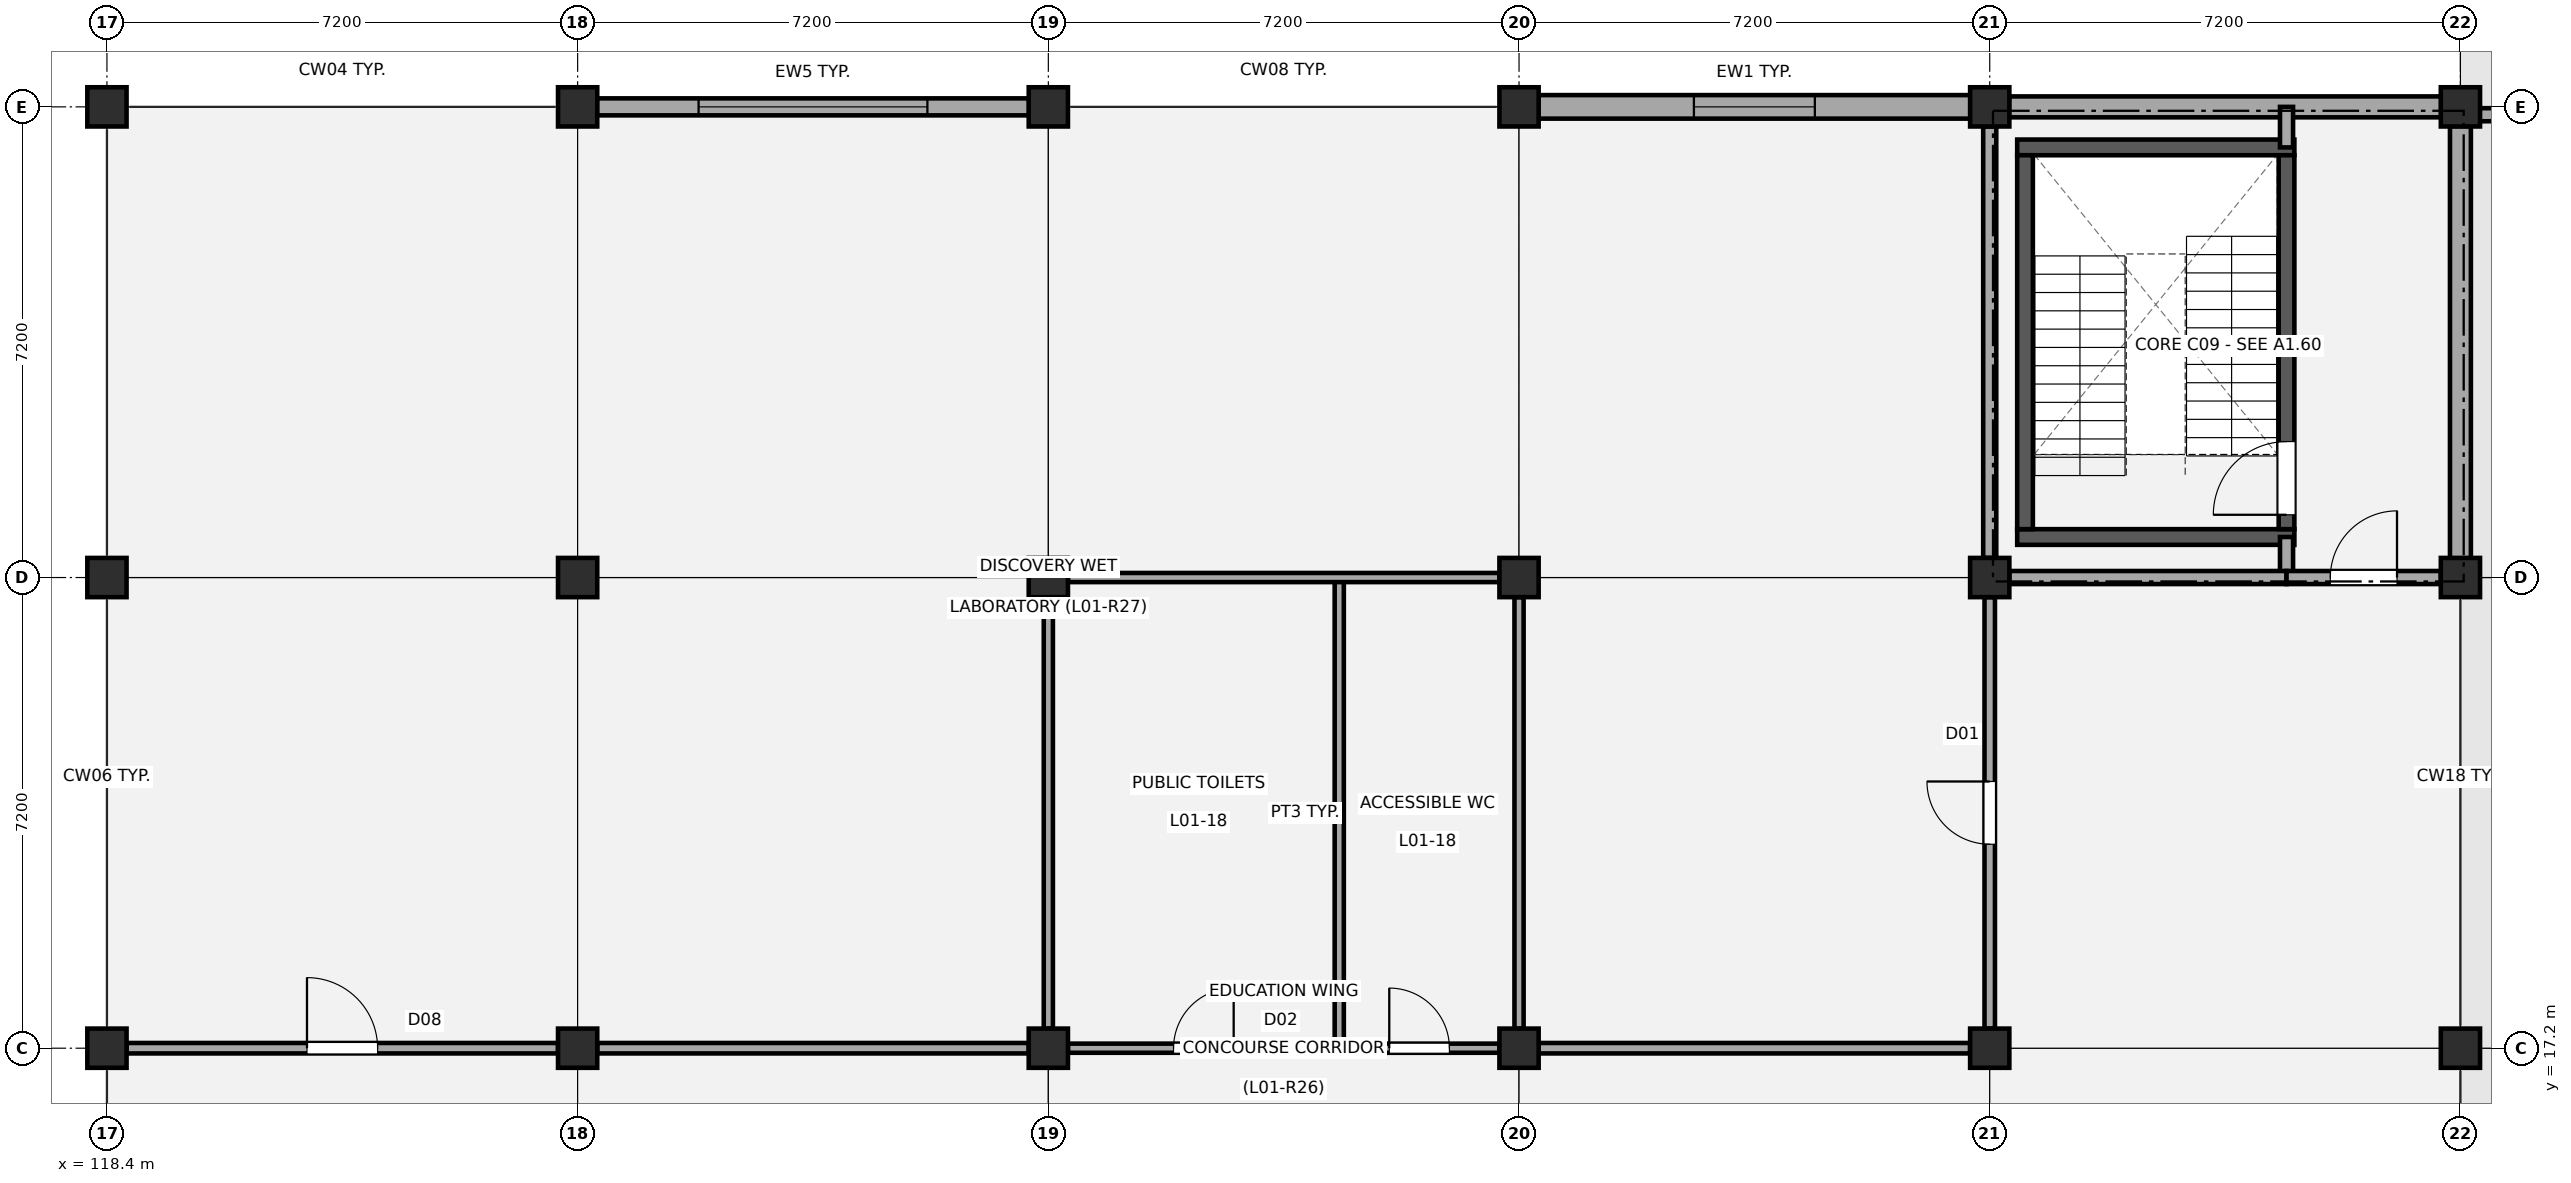
"""IFC4 building model, lengths in metres.
Left out: names, types, materials, properties, quantities, classifications, styles, units other than length and angle.
Written with IfcOpenShell. Run it as: python <this file> out.ifc"""

import sys

from ifc_helpers import new_model, si_unit, direction, frame, frame_2d, origin, origin_2d, place, context, subcontext, project, spatial, rectangle, extrude, element, fill, save


model = new_model("IFC4")
c1 = context("Model", 3, precision=1e-05, world=origin(), true_north=direction((0.0, 1.0)))
c2 = subcontext(c1, "Body", "Model", "MODEL_VIEW")
j1 = project(units=[si_unit("LENGTHUNIT", "METRE"), si_unit("PLANEANGLEUNIT", "RADIAN")], contexts=[c1])
p1 = place(None, origin())
s1 = spatial("IfcSite", under=j1, at=p1, CompositionType="ELEMENT")
p2 = place(p1, origin())
s2 = spatial("IfcBuilding", under=s1, at=p2, CompositionType="ELEMENT")
p3 = place(p2, frame((0.0, 0.0, 4.68)))
s3 = spatial("IfcBuildingStorey", under=s2, at=p3, CompositionType="ELEMENT", Elevation=4.68)
for number, where, z_axis, x_axis in (
    (1, (118.4, 17.2, 0.0), (0.0, 0.0, 1.0), (1.0, 0.0, 0.0)),
    (2, (118.4, 24.4, 0.0), (0.0, 0.0, 1.0), (1.0, 0.0, 0.0)),
    (3, (118.4, 31.6, 0.0), (0.0, 0.0, 1.0), (1.0, 0.0, 0.0)),
    (4, (125.6, 17.2, 0.0), (0.0, 0.0, 1.0), (1.0, 0.0, 0.0)),
    (5, (125.6, 24.4, 0.0), (0.0, 0.0, 1.0), (1.0, 0.0, 0.0)),
    (6, (125.6, 31.6, 0.0), (0.0, 0.0, 1.0), (1.0, 0.0, 0.0)),
    (7, (132.8, 17.2, 0.0), (0.0, 0.0, 1.0), (1.0, 0.0, 0.0)),
    (8, (132.8, 24.4, 0.0), (0.0, 0.0, 1.0), (1.0, 0.0, 0.0)),
    (9, (132.8, 31.6, 0.0), (0.0, 0.0, 1.0), (1.0, 0.0, 0.0)),
    (10, (140.0, 17.2, 0.0), (0.0, 0.0, 1.0), (1.0, 0.0, 0.0)),
    (11, (140.0, 24.4, 0.0), (0.0, 0.0, 1.0), (1.0, 0.0, 0.0)),
    (12, (140.0, 31.6, 0.0), (0.0, 0.0, 1.0), (1.0, 0.0, 0.0)),
    (13, (147.2, 17.2, 0.0), (0.0, 0.0, 1.0), (1.0, 0.0, 0.0)),
    (14, (147.2, 24.4, 0.0), (0.0, 0.0, 1.0), (1.0, 0.0, 0.0)),
    (15, (147.2, 31.6, 0.0), (0.0, 0.0, 1.0), (1.0, 0.0, 0.0)),
    (16, (154.4, 17.2, 0.0), (0.0, 0.0, 1.0), (1.0, 0.0, 0.0)),
    (17, (154.4, 24.4, 0.0), (0.0, 0.0, 1.0), (1.0, 0.0, 0.0)),
    (18, (154.4, 31.6, 0.0), (0.0, 0.0, 1.0), (1.0, 0.0, 0.0)),
):
    element("IfcColumn", number, at=place(p3, frame(where, z_axis=z_axis, x_axis=x_axis)), inside=s3, PredefinedType="COLUMN", context=c2, shape_type="SweptSolid", body=[
        extrude(rectangle(XDim=0.6, YDim=0.6, at=origin_2d()), origin(), (0.0, 0.0, 1.0), 4.5),
    ])
p4 = place(p3, frame((125.895, 31.6, 0.0), z_axis=(0.0, 0.0, 1.0), x_axis=(1.0, 0.0, 0.0)))
e19 = element("IfcWall", 19, at=p4, inside=s3, PredefinedType="STANDARD", context=c2, shape_type="SweptSolid", body=[
    extrude(rectangle(XDim=6.61, YDim=0.26, at=frame_2d((3.305, 0.0))), origin(), (0.0, 0.0, 1.0), 3.49),
])
p5 = place(p4, frame((1.555, 0.0, 0.95)))
e20 = element("IfcOpeningElement", 20, at=p5, cuts=e19, PredefinedType="OPENING", context=c2, shape_type="SweptSolid", body=[
    extrude(rectangle(XDim=3.5, YDim=1.55, at=frame_2d((1.75, 0.775))), frame((0.0, 0.14, 0.0), z_axis=(0.0, -1.0, 0.0), x_axis=(1.0, 0.0, 0.0)), (0.0, 0.0, 1.0), 0.28),
])
p6 = place(p3, frame((140.295, 31.6, 0.0), z_axis=(0.0, 0.0, 1.0), x_axis=(1.0, 0.0, 0.0)))
e21 = element("IfcWall", 21, at=p6, inside=s3, PredefinedType="STANDARD", context=c2, shape_type="SweptSolid", body=[
    extrude(rectangle(XDim=6.61, YDim=0.36, at=frame_2d((3.305, 0.0))), origin(), (0.0, 0.0, 1.0), 3.49),
])
p7 = place(p6, frame((2.38, 0.0, 0.95)))
e22 = element("IfcOpeningElement", 22, at=p7, cuts=e21, PredefinedType="OPENING", context=c2, shape_type="SweptSolid", body=[
    extrude(rectangle(XDim=1.85, YDim=1.9, at=frame_2d((0.925, 0.95))), frame((0.0, 0.19, 0.0), z_axis=(0.0, -1.0, 0.0), x_axis=(1.0, 0.0, 0.0)), (0.0, 0.0, 1.0), 0.38),
])
for number, where, z_axis, x_axis in (
    (23, (147.495, 31.6, 0.0), (0.0, 0.0, 1.0), (1.0, 0.0, 0.0)),
    (24, (154.4, 31.305, 0.0), (0.0, 0.0, 1.0), (0.0, -1.0, 0.0)),
):
    element("IfcWall", number, at=place(p3, frame(where, z_axis=z_axis, x_axis=x_axis)), inside=s3, PredefinedType="STANDARD", context=c2, shape_type="SweptSolid", body=[
        extrude(rectangle(XDim=6.61, YDim=0.32, at=frame_2d((3.305, 0.0))), origin(), (0.0, 0.0, 1.0), 3.51),
    ])
p8 = place(p3, frame((154.4, 31.48, 0.0), z_axis=(0.0, 0.0, 1.0), x_axis=(1.0, 0.0, 0.0)))
e25 = element("IfcWall", 25, at=p8, inside=s3, PredefinedType="PARAPET", context=c2, shape_type="SweptSolid", body=[
    extrude(rectangle(XDim=7.2, YDim=0.2, at=frame_2d((3.6, 0.0))), origin(), (0.0, 0.0, 1.0), 0.72),
])
for number, where, z_axis, x_axis in (
    (26, (147.62, 25.02, 0.0), (0.0, 0.0, 1.0), (1.0, 0.0, 0.0)),
    (27, (147.62, 30.98, 0.0), (0.0, 0.0, 1.0), (1.0, 0.0, 0.0)),
):
    element("IfcWall", number, at=place(p3, frame(where, z_axis=z_axis, x_axis=x_axis)), inside=s3, PredefinedType="SHEAR", context=c2, shape_type="SweptSolid", body=[
        extrude(rectangle(XDim=4.24, YDim=0.24, at=frame_2d((2.12, 0.0))), origin(), (0.0, 0.0, 1.0), 4.22),
    ])
p9 = place(p3, frame((147.74, 25.14, 0.0), z_axis=(0.0, 0.0, 1.0), x_axis=(0.0, 1.0, 0.0)))
e28 = element("IfcWall", 28, at=p9, inside=s3, PredefinedType="SHEAR", context=c2, shape_type="SweptSolid", body=[
    extrude(rectangle(XDim=5.72, YDim=0.24, at=frame_2d((2.86, 0.0))), origin(), (0.0, 0.0, 1.0), 4.22),
])
p10 = place(p3, frame((151.74, 25.14, 0.0), z_axis=(0.0, 0.0, 1.0), x_axis=(0.0, 1.0, 0.0)))
e29 = element("IfcWall", 29, at=p10, inside=s3, PredefinedType="SHEAR", context=c2, shape_type="SweptSolid", body=[
    extrude(rectangle(XDim=5.72, YDim=0.24, at=frame_2d((2.86, 0.0))), origin(), (0.0, 0.0, 1.0), 4.22),
])
p11 = place(p10, frame((0.22, 0.0, 0.0)))
e30 = element("IfcOpeningElement", 30, at=p11, cuts=e29, PredefinedType="OPENING", context=c2, shape_type="SweptSolid", body=[
    extrude(rectangle(XDim=1.12, YDim=2.15, at=frame_2d((0.56, 1.075))), frame((0.0, 0.13, 0.0), z_axis=(0.0, -1.0, 0.0), x_axis=(1.0, 0.0, 0.0)), (0.0, 0.0, 1.0), 0.26),
])
p12 = place(p3, frame((151.74, 24.4, 0.0), z_axis=(0.0, 0.0, 1.0), x_axis=(0.0, 1.0, 0.0)))
e31 = element("IfcWall", 31, at=p12, inside=s3, PredefinedType="PARTITIONING", context=c2, shape_type="SweptSolid", body=[
    extrude(rectangle(XDim=0.62, YDim=0.2, at=frame_2d((0.31, 0.0))), origin(), (0.0, 0.0, 1.0), 3.59),
])
p13 = place(p3, frame((151.74, 30.98, 0.0), z_axis=(0.0, 0.0, 1.0), x_axis=(0.0, 1.0, 0.0)))
e32 = element("IfcWall", 32, at=p13, inside=s3, PredefinedType="PARTITIONING", context=c2, shape_type="SweptSolid", body=[
    extrude(rectangle(XDim=0.62, YDim=0.2, at=frame_2d((0.31, 0.0))), origin(), (0.0, 0.0, 1.0), 3.51),
])
p14 = place(p3, frame((147.2, 24.7, 0.0), z_axis=(0.0, 0.0, 1.0), x_axis=(0.0, 1.0, 0.0)))
e33 = element("IfcWall", 33, at=p14, inside=s3, PredefinedType="PARTITIONING", context=c2, shape_type="SweptSolid", body=[
    extrude(rectangle(XDim=6.6, YDim=0.2, at=frame_2d((3.3, 0.0))), origin(), (0.0, 0.0, 1.0), 3.59),
])
p15 = place(p3, frame((147.5, 24.4, 0.0), z_axis=(0.0, 0.0, 1.0), x_axis=(1.0, 0.0, 0.0)))
e34 = element("IfcWall", 34, at=p15, inside=s3, PredefinedType="PARTITIONING", context=c2, shape_type="SweptSolid", body=[
    extrude(rectangle(XDim=4.24, YDim=0.2, at=frame_2d((2.12, 0.0))), origin(), (0.0, 0.0, 1.0), 3.59),
])
p16 = place(p3, frame((151.74, 24.4, 0.0), z_axis=(0.0, 0.0, 1.0), x_axis=(1.0, 0.0, 0.0)))
e35 = element("IfcWall", 35, at=p16, inside=s3, PredefinedType="PARTITIONING", context=c2, shape_type="SweptSolid", body=[
    extrude(rectangle(XDim=2.36, YDim=0.2, at=frame_2d((1.18, 0.0))), origin(), (0.0, 0.0, 1.0), 3.59),
])
p17 = place(p16, frame((0.67, 0.0, 0.0)))
e36 = element("IfcOpeningElement", 36, at=p17, cuts=e35, PredefinedType="OPENING", context=c2, shape_type="SweptSolid", body=[
    extrude(rectangle(XDim=1.02, YDim=2.15, at=frame_2d((0.51, 1.075))), frame((0.0, 0.11, 0.0), z_axis=(0.0, -1.0, 0.0), x_axis=(1.0, 0.0, 0.0)), (0.0, 0.0, 1.0), 0.22),
])
p18 = place(p3, frame((137.25, 17.2, 0.0), z_axis=(0.0, 0.0, 1.0), x_axis=(0.0, 1.0, 0.0)))
e37 = element("IfcWall", 37, at=p18, inside=s3, PredefinedType="PARTITIONING", context=c2, shape_type="SweptSolid", body=[
    extrude(rectangle(XDim=7.2, YDim=0.14, at=frame_2d((3.6, 0.0))), origin(), (0.0, 0.0, 1.0), 3.62),
])
p19 = place(p3, frame((133.1, 17.2, 0.0), z_axis=(0.0, 0.0, 1.0), x_axis=(1.0, 0.0, 0.0)))
e38 = element("IfcWall", 38, at=p19, inside=s3, PredefinedType="PARTITIONING", context=c2, shape_type="SweptSolid", body=[
    extrude(rectangle(XDim=4.15, YDim=0.14, at=frame_2d((2.075, 0.0))), origin(), (0.0, 0.0, 1.0), 3.54),
])
p20 = place(p19, frame((1.615, 0.0, 0.0)))
e39 = element("IfcOpeningElement", 39, at=p20, cuts=e38, PredefinedType="OPENING", context=c2, shape_type="SweptSolid", body=[
    extrude(rectangle(XDim=0.92, YDim=2.08, at=frame_2d((0.46, 1.04))), frame((0.0, 0.08, 0.0), z_axis=(0.0, -1.0, 0.0), x_axis=(1.0, 0.0, 0.0)), (0.0, 0.0, 1.0), 0.16),
])
p21 = place(p3, frame((137.25, 17.2, 0.0), z_axis=(0.0, 0.0, 1.0), x_axis=(1.0, 0.0, 0.0)))
e40 = element("IfcWall", 40, at=p21, inside=s3, PredefinedType="PARTITIONING", context=c2, shape_type="SweptSolid", body=[
    extrude(rectangle(XDim=2.45, YDim=0.14, at=frame_2d((1.225, 0.0))), origin(), (0.0, 0.0, 1.0), 3.54),
])
p22 = place(p21, frame((0.765, 0.0, 0.0)))
e41 = element("IfcOpeningElement", 41, at=p22, cuts=e40, PredefinedType="OPENING", context=c2, shape_type="SweptSolid", body=[
    extrude(rectangle(XDim=0.92, YDim=2.08, at=frame_2d((0.46, 1.04))), frame((0.0, 0.08, 0.0), z_axis=(0.0, -1.0, 0.0), x_axis=(1.0, 0.0, 0.0)), (0.0, 0.0, 1.0), 0.16),
])
p23 = place(p3, frame((133.1, 24.4, 0.0), z_axis=(0.0, 0.0, 1.0), x_axis=(1.0, 0.0, 0.0)))
e42 = element("IfcWall", 42, at=p23, inside=s3, PredefinedType="PARTITIONING", context=c2, shape_type="SweptSolid", body=[
    extrude(rectangle(XDim=6.6, YDim=0.14, at=frame_2d((3.3, 0.0))), origin(), (0.0, 0.0, 1.0), 3.59),
])
for number, where, z_axis, x_axis in (
    (43, (132.8, 17.5, 0.0), (0.0, 0.0, 1.0), (0.0, 1.0, 0.0)),
    (44, (140.0, 17.5, 0.0), (0.0, 0.0, 1.0), (0.0, 1.0, 0.0)),
):
    element("IfcWall", number, at=place(p3, frame(where, z_axis=z_axis, x_axis=x_axis)), inside=s3, PredefinedType="PARTITIONING", context=c2, shape_type="SweptSolid", body=[
        extrude(rectangle(XDim=6.6, YDim=0.14, at=frame_2d((3.3, 0.0))), origin(), (0.0, 0.0, 1.0), 3.54),
    ])
p24 = place(p3, frame((118.7, 17.2, 0.0), z_axis=(0.0, 0.0, 1.0), x_axis=(1.0, 0.0, 0.0)))
e45 = element("IfcWall", 45, at=p24, inside=s3, PredefinedType="PARTITIONING", context=c2, shape_type="SweptSolid", body=[
    extrude(rectangle(XDim=6.6, YDim=0.16, at=frame_2d((3.3, 0.0))), origin(), (0.0, 0.0, 1.0), 3.54),
])
p25 = place(p24, frame((2.76, 0.0, 0.0)))
e46 = element("IfcOpeningElement", 46, at=p25, cuts=e45, PredefinedType="OPENING", context=c2, shape_type="SweptSolid", body=[
    extrude(rectangle(XDim=1.08, YDim=2.16, at=frame_2d((0.54, 1.08))), frame((0.0, 0.09, 0.0), z_axis=(0.0, -1.0, 0.0), x_axis=(1.0, 0.0, 0.0)), (0.0, 0.0, 1.0), 0.18),
])
p26 = place(p3, frame((125.9, 17.2, 0.0), z_axis=(0.0, 0.0, 1.0), x_axis=(1.0, 0.0, 0.0)))
e47 = element("IfcWall", 47, at=p26, inside=s3, PredefinedType="PARTITIONING", context=c2, shape_type="SweptSolid", body=[
    extrude(rectangle(XDim=6.6, YDim=0.16, at=frame_2d((3.3, 0.0))), origin(), (0.0, 0.0, 1.0), 3.59),
])
p27 = place(p3, frame((140.3, 17.2, 0.0), z_axis=(0.0, 0.0, 1.0), x_axis=(1.0, 0.0, 0.0)))
e48 = element("IfcWall", 48, at=p27, inside=s3, PredefinedType="PARTITIONING", context=c2, shape_type="SweptSolid", body=[
    extrude(rectangle(XDim=6.6, YDim=0.16, at=frame_2d((3.3, 0.0))), origin(), (0.0, 0.0, 1.0), 3.59),
])
p28 = place(p3, frame((147.2, 17.5, 0.0), z_axis=(0.0, 0.0, 1.0), x_axis=(0.0, 1.0, 0.0)))
e49 = element("IfcWall", 49, at=p28, inside=s3, PredefinedType="PARTITIONING", context=c2, shape_type="SweptSolid", body=[
    extrude(rectangle(XDim=6.6, YDim=0.16, at=frame_2d((3.3, 0.0))), origin(), (0.0, 0.0, 1.0), 3.54),
])
p29 = place(p28, frame((2.82, 0.0, 0.0)))
e50 = element("IfcOpeningElement", 50, at=p29, cuts=e49, PredefinedType="OPENING", context=c2, shape_type="SweptSolid", body=[
    extrude(rectangle(XDim=0.96, YDim=2.1, at=frame_2d((0.48, 1.05))), frame((0.0, 0.09, 0.0), z_axis=(0.0, -1.0, 0.0), x_axis=(1.0, 0.0, 0.0)), (0.0, 0.0, 1.0), 0.18),
])
p30 = place(p5, origin())
e51 = element("IfcWindow", 51, at=p30, inside=s3, PartitioningType="SINGLE_PANEL", PredefinedType="WINDOW", context=c2, shape_type="SweptSolid", body=[
    extrude(rectangle(XDim=3.5, YDim=1.55, at=frame_2d((1.75, 0.775))), frame((0.0, 0.03, 0.0), z_axis=(0.0, -1.0, 0.0), x_axis=(1.0, 0.0, 0.0)), (0.0, 0.0, 1.0), 0.06),
])
fill(e20, e51)
p31 = place(p7, origin())
e52 = element("IfcWindow", 52, at=p31, inside=s3, PartitioningType="SINGLE_PANEL", PredefinedType="WINDOW", context=c2, shape_type="SweptSolid", body=[
    extrude(rectangle(XDim=1.85, YDim=1.9, at=frame_2d((0.925, 0.95))), frame((0.0, 0.03, 0.0), z_axis=(0.0, -1.0, 0.0), x_axis=(1.0, 0.0, 0.0)), (0.0, 0.0, 1.0), 0.06),
])
fill(e22, e52)
p32 = place(p11, origin())
e53 = element("IfcDoor", 53, at=p32, inside=s3, OperationType="SINGLE_SWING_LEFT", PredefinedType="DOOR", context=c2, shape_type="SweptSolid", body=[
    extrude(rectangle(XDim=1.12, YDim=2.15, at=frame_2d((0.56, 1.075))), frame((0.0, 0.025, 0.0), z_axis=(0.0, -1.0, 0.0), x_axis=(1.0, 0.0, 0.0)), (0.0, 0.0, 1.0), 0.05),
])
fill(e30, e53)
p33 = place(p17, origin())
e54 = element("IfcDoor", 54, at=p33, inside=s3, OperationType="SINGLE_SWING_RIGHT", PredefinedType="DOOR", context=c2, shape_type="SweptSolid", body=[
    extrude(rectangle(XDim=1.02, YDim=2.15, at=frame_2d((0.51, 1.075))), frame((0.0, 0.025, 0.0), z_axis=(0.0, -1.0, 0.0), x_axis=(1.0, 0.0, 0.0)), (0.0, 0.0, 1.0), 0.05),
])
fill(e36, e54)
p34 = place(p20, origin())
e55 = element("IfcDoor", 55, at=p34, inside=s3, OperationType="SINGLE_SWING_RIGHT", PredefinedType="DOOR", context=c2, shape_type="SweptSolid", body=[
    extrude(rectangle(XDim=0.92, YDim=2.08, at=frame_2d((0.46, 1.04))), frame((0.0, 0.025, 0.0), z_axis=(0.0, -1.0, 0.0), x_axis=(1.0, 0.0, 0.0)), (0.0, 0.0, 1.0), 0.05),
])
fill(e39, e55)
p35 = place(p22, origin())
e56 = element("IfcDoor", 56, at=p35, inside=s3, OperationType="SINGLE_SWING_LEFT", PredefinedType="DOOR", context=c2, shape_type="SweptSolid", body=[
    extrude(rectangle(XDim=0.92, YDim=2.08, at=frame_2d((0.46, 1.04))), frame((0.0, 0.025, 0.0), z_axis=(0.0, -1.0, 0.0), x_axis=(1.0, 0.0, 0.0)), (0.0, 0.0, 1.0), 0.05),
])
fill(e41, e56)
p36 = place(p25, origin())
e57 = element("IfcDoor", 57, at=p36, inside=s3, OperationType="SINGLE_SWING_LEFT", PredefinedType="DOOR", context=c2, shape_type="SweptSolid", body=[
    extrude(rectangle(XDim=1.08, YDim=2.16, at=frame_2d((0.54, 1.08))), frame((0.0, 0.025, 0.0), z_axis=(0.0, -1.0, 0.0), x_axis=(1.0, 0.0, 0.0)), (0.0, 0.0, 1.0), 0.05),
])
fill(e46, e57)
p37 = place(p29, origin())
e58 = element("IfcDoor", 58, at=p37, inside=s3, OperationType="SINGLE_SWING_RIGHT", PredefinedType="DOOR", context=c2, shape_type="SweptSolid", body=[
    extrude(rectangle(XDim=0.96, YDim=2.1, at=frame_2d((0.48, 1.05))), frame((0.0, 0.025, 0.0), z_axis=(0.0, -1.0, 0.0), x_axis=(1.0, 0.0, 0.0)), (0.0, 0.0, 1.0), 0.05),
])
fill(e50, e58)
save(model, sys.argv[1])
